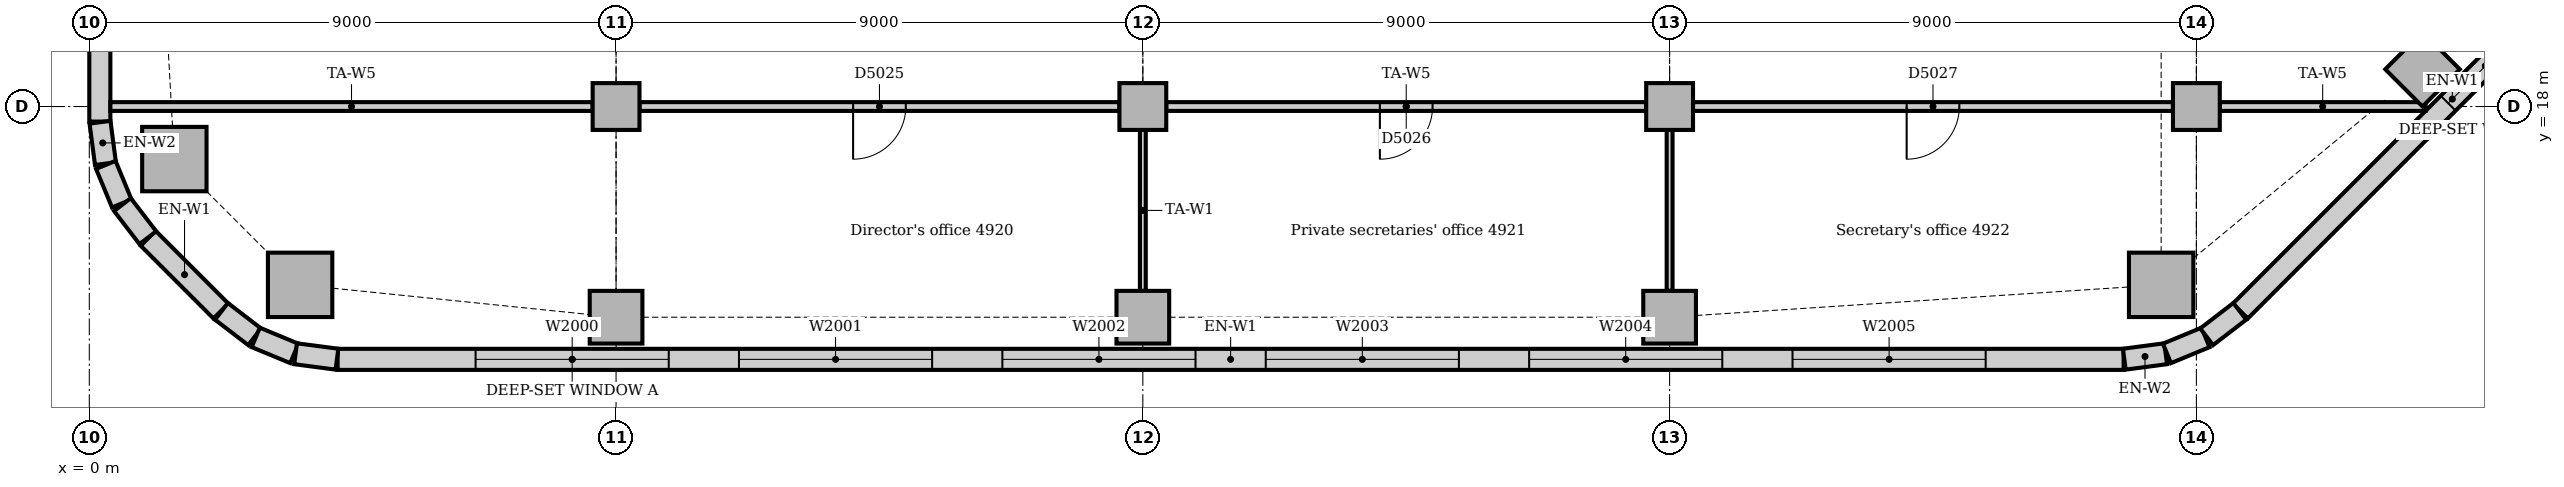
"""IFC4 building model, lengths in metres.
Left out: names, types, materials, properties, quantities, classifications, styles, units other than length and angle.
Written with IfcOpenShell. Run it as: python <this file> out.ifc"""

import sys

from ifc_helpers import new_model, si_unit, direction, frame, frame_2d, origin, origin_2d, place, context, subcontext, project, spatial, rectangle, extrude, element, fill, save


model = new_model("IFC4")
c1 = context("Model", 3, precision=1e-05, world=origin(), true_north=direction((0.0, 1.0)))
c2 = subcontext(c1, "Body", "Model", "MODEL_VIEW")
j1 = project(units=[si_unit("LENGTHUNIT", "METRE"), si_unit("PLANEANGLEUNIT", "RADIAN")], contexts=[c1])
p1 = place(None, origin())
s1 = spatial("IfcSite", under=j1, at=p1, CompositionType="ELEMENT")
p2 = place(p1, origin())
s2 = spatial("IfcBuilding", under=s1, at=p2, CompositionType="ELEMENT")
p3 = place(p2, frame((0.0, 0.0, 206.0)))
s3 = spatial("IfcBuildingStorey", under=s2, at=p3, CompositionType="ELEMENT", Elevation=206.0)
for number, where, z_axis, x_axis in (
    (1, (3.602, 14.953, 0.0), (0.0, 0.0, 1.0), (1.0, 0.0, 0.0)),
    (2, (35.398, 14.953, 0.0), (0.0, 0.0, 1.0), (1.0, 0.0, 0.0)),
    (3, (1.453, 17.102, 0.0), (0.0, 0.0, 1.0), (1.0, 0.0, 0.0)),
):
    element("IfcColumn", number, at=place(p3, frame(where, z_axis=z_axis, x_axis=x_axis)), inside=s3, PredefinedType="COLUMN", context=c2, shape_type="SweptSolid", body=[
        extrude(rectangle(XDim=1.1, YDim=1.1, at=origin_2d()), origin(), (0.0, 0.0, 1.0), 3.85),
    ])
for number, where, z_axis, x_axis in (
    (4, (9.0, 14.4, 0.0), (0.0, 0.0, 1.0), (1.0, 0.0, 0.0)),
    (5, (18.0, 14.4, 0.0), (0.0, 0.0, 1.0), (1.0, 0.0, 0.0)),
    (6, (27.0, 14.4, 0.0), (0.0, 0.0, 1.0), (1.0, 0.0, 0.0)),
    (7, (39.864, 18.636, 0.0), (0.0, 0.0, 1.0), (0.707, 0.707, 0.0)),
):
    element("IfcColumn", number, at=place(p3, frame(where, z_axis=z_axis, x_axis=x_axis)), inside=s3, PredefinedType="COLUMN", context=c2, shape_type="SweptSolid", body=[
        extrude(rectangle(XDim=0.9, YDim=0.9, at=origin_2d()), origin(), (0.0, 0.0, 1.0), 3.85),
    ])
for number, where, z_axis, x_axis in (
    (8, (9.0, 18.0, 0.0), (0.0, 0.0, 1.0), (1.0, 0.0, 0.0)),
    (9, (18.0, 18.0, 0.0), (0.0, 0.0, 1.0), (1.0, 0.0, 0.0)),
    (10, (27.0, 18.0, 0.0), (0.0, 0.0, 1.0), (1.0, 0.0, 0.0)),
    (11, (36.0, 18.0, 0.0), (0.0, 0.0, 1.0), (1.0, 0.0, 0.0)),
):
    element("IfcColumn", number, at=place(p3, frame(where, z_axis=z_axis, x_axis=x_axis)), inside=s3, PredefinedType="COLUMN", context=c2, shape_type="SweptSolid", body=[
        extrude(rectangle(XDim=0.8, YDim=0.8, at=origin_2d()), origin(), (0.0, 0.0, 1.0), 3.85),
    ])
p4 = place(p3, frame((4.243, 13.68, 0.0), z_axis=(0.0, 0.0, 1.0), x_axis=(1.0, 0.0, 0.0)))
e12 = element("IfcWall", 12, at=p4, inside=s3, PredefinedType="STANDARD", context=c2, shape_type="SweptSolid", body=[
    extrude(rectangle(XDim=30.515, YDim=0.36, at=frame_2d((15.257, 0.0))), origin(), (0.0, 0.0, 1.0), 3.85),
])
p5 = place(p4, frame((2.357, 0.0, 0.9)))
e13 = element("IfcOpeningElement", 13, at=p5, cuts=e12, PredefinedType="OPENING", context=c2, shape_type="SweptSolid", body=[
    extrude(rectangle(XDim=3.3, YDim=1.6, at=frame_2d((1.65, 0.8))), frame((0.0, 0.19, 0.0), z_axis=(0.0, -1.0, 0.0), x_axis=(1.0, 0.0, 0.0)), (0.0, 0.0, 1.0), 0.38),
])
p6 = place(p4, frame((6.857, 0.0, 0.9)))
e14 = element("IfcOpeningElement", 14, at=p6, cuts=e12, PredefinedType="OPENING", context=c2, shape_type="SweptSolid", body=[
    extrude(rectangle(XDim=3.3, YDim=1.6, at=frame_2d((1.65, 0.8))), frame((0.0, 0.19, 0.0), z_axis=(0.0, -1.0, 0.0), x_axis=(1.0, 0.0, 0.0)), (0.0, 0.0, 1.0), 0.38),
])
p7 = place(p4, frame((11.357, 0.0, 0.9)))
e15 = element("IfcOpeningElement", 15, at=p7, cuts=e12, PredefinedType="OPENING", context=c2, shape_type="SweptSolid", body=[
    extrude(rectangle(XDim=3.3, YDim=1.6, at=frame_2d((1.65, 0.8))), frame((0.0, 0.19, 0.0), z_axis=(0.0, -1.0, 0.0), x_axis=(1.0, 0.0, 0.0)), (0.0, 0.0, 1.0), 0.38),
])
p8 = place(p4, frame((15.857, 0.0, 0.9)))
e16 = element("IfcOpeningElement", 16, at=p8, cuts=e12, PredefinedType="OPENING", context=c2, shape_type="SweptSolid", body=[
    extrude(rectangle(XDim=3.3, YDim=1.6, at=frame_2d((1.65, 0.8))), frame((0.0, 0.19, 0.0), z_axis=(0.0, -1.0, 0.0), x_axis=(1.0, 0.0, 0.0)), (0.0, 0.0, 1.0), 0.38),
])
p9 = place(p4, frame((20.357, 0.0, 0.9)))
e17 = element("IfcOpeningElement", 17, at=p9, cuts=e12, PredefinedType="OPENING", context=c2, shape_type="SweptSolid", body=[
    extrude(rectangle(XDim=3.3, YDim=1.6, at=frame_2d((1.65, 0.8))), frame((0.0, 0.19, 0.0), z_axis=(0.0, -1.0, 0.0), x_axis=(1.0, 0.0, 0.0)), (0.0, 0.0, 1.0), 0.38),
])
p10 = place(p4, frame((24.857, 0.0, 0.9)))
e18 = element("IfcOpeningElement", 18, at=p10, cuts=e12, PredefinedType="OPENING", context=c2, shape_type="SweptSolid", body=[
    extrude(rectangle(XDim=3.3, YDim=1.6, at=frame_2d((1.65, 0.8))), frame((0.0, 0.19, 0.0), z_axis=(0.0, -1.0, 0.0), x_axis=(1.0, 0.0, 0.0)), (0.0, 0.0, 1.0), 0.38),
])
p11 = place(p3, frame((36.751, 14.506, 0.0), z_axis=(0.0, 0.0, 1.0), x_axis=(0.707106781187, 0.707106781187, 0.0)))
e19 = element("IfcWall", 19, at=p11, inside=s3, PredefinedType="STANDARD", context=c2, shape_type="SweptSolid", body=[
    extrude(rectangle(XDim=10.243, YDim=0.36, at=frame_2d((5.121, 0.0))), origin(), (0.0, 0.0, 1.0), 3.85),
])
p12 = place(p11, frame((5.021, 0.0, 0.9)))
e20 = element("IfcOpeningElement", 20, at=p12, cuts=e19, PredefinedType="OPENING", context=c2, shape_type="SweptSolid", body=[
    extrude(rectangle(XDim=1.8, YDim=1.6, at=frame_2d((0.9, 0.8))), frame((0.0, 0.19, 0.0), z_axis=(0.0, -1.0, 0.0), x_axis=(1.0, 0.0, 0.0)), (0.0, 0.0, 1.0), 0.38),
])
p13 = place(p3, frame((0.18, 21.0, 0.0), z_axis=(0.0, 0.0, 1.0), x_axis=(0.0, -1.0, 0.0)))
e21 = element("IfcWall", 21, at=p13, inside=s3, PredefinedType="STANDARD", context=c2, shape_type="SweptSolid", body=[
    extrude(rectangle(XDim=3.257, YDim=0.36, at=frame_2d((1.629, 0.0))), origin(), (0.0, 0.0, 1.0), 3.85),
])
p14 = place(p3, frame((1.006, 15.749, 0.0), z_axis=(0.0, 0.0, 1.0), x_axis=(0.707106781187, -0.707106781187, 0.0)))
e22 = element("IfcWall", 22, at=p14, inside=s3, PredefinedType="STANDARD", context=c2, shape_type="SweptSolid", body=[
    extrude(rectangle(XDim=1.757, YDim=0.36, at=frame_2d((0.879, 0.0))), origin(), (0.0, 0.0, 1.0), 3.85),
])
for number, where, z_axis, x_axis in (
    (23, (34.769, 13.683, 0.0), (0.0, 0.0, 1.0), (0.991, 0.131, 0.0)),
    (24, (35.497, 13.782, 0.0), (0.0, 0.0, 1.0), (0.924, 0.383, 0.0)),
):
    element("IfcWall", number, at=place(p3, frame(where, z_axis=z_axis, x_axis=x_axis)), inside=s3, PredefinedType="STANDARD", context=c2, shape_type="SweptSolid", body=[
        extrude(rectangle(XDim=0.713, YDim=0.36, at=frame_2d((0.356, 0.0))), origin(), (0.0, 0.0, 1.0), 3.85),
    ])
p15 = place(p3, frame((36.175, 14.066, 0.0), z_axis=(0.0, 0.0, 1.0), x_axis=(0.793321924995, 0.608802368033, 0.0)))
e25 = element("IfcWall", 25, at=p15, inside=s3, PredefinedType="STANDARD", context=c2, shape_type="SweptSolid", body=[
    extrude(rectangle(XDim=0.713, YDim=0.36, at=frame_2d((0.357, 0.0))), origin(), (0.0, 0.0, 1.0), 3.85),
])
for number, where, z_axis, x_axis in (
    (26, (0.183, 17.731, 0.0), (0.0, 0.0, 1.0), (0.131, -0.991, 0.0)),
    (27, (0.282, 17.003, 0.0), (0.0, 0.0, 1.0), (0.383, -0.924, 0.0)),
):
    element("IfcWall", number, at=place(p3, frame(where, z_axis=z_axis, x_axis=x_axis)), inside=s3, PredefinedType="STANDARD", context=c2, shape_type="SweptSolid", body=[
        extrude(rectangle(XDim=0.713, YDim=0.36, at=frame_2d((0.356, 0.0))), origin(), (0.0, 0.0, 1.0), 3.85),
    ])
for number, where, z_axis, x_axis in (
    (28, (0.566, 16.325, 0.0), (0.0, 0.0, 1.0), (0.609, -0.793, 0.0)),
    (29, (2.259, 14.5, 0.0), (0.0, 0.0, 1.0), (0.793, -0.609, 0.0)),
):
    element("IfcWall", number, at=place(p3, frame(where, z_axis=z_axis, x_axis=x_axis)), inside=s3, PredefinedType="STANDARD", context=c2, shape_type="SweptSolid", body=[
        extrude(rectangle(XDim=0.713, YDim=0.36, at=frame_2d((0.357, 0.0))), origin(), (0.0, 0.0, 1.0), 3.85),
    ])
for number, where, z_axis, x_axis in (
    (30, (2.844, 14.055, 0.0), (0.0, 0.0, 1.0), (0.924, -0.383, 0.0)),
    (31, (3.524, 13.776, 0.0), (0.0, 0.0, 1.0), (0.991, -0.131, 0.0)),
):
    element("IfcWall", number, at=place(p3, frame(where, z_axis=z_axis, x_axis=x_axis)), inside=s3, PredefinedType="STANDARD", context=c2, shape_type="SweptSolid", body=[
        extrude(rectangle(XDim=0.713, YDim=0.36, at=frame_2d((0.356, 0.0))), origin(), (0.0, 0.0, 1.0), 3.85),
    ])
p16 = place(p3, frame((36.4, 18.0, 0.0), z_axis=(0.0, 0.0, 1.0), x_axis=(1.0, 0.0, 0.0)))
e32 = element("IfcWall", 32, at=p16, inside=s3, PredefinedType="PARTITIONING", context=c2, shape_type="SweptSolid", body=[
    extrude(rectangle(XDim=3.516, YDim=0.15, at=frame_2d((1.758, 0.0))), origin(), (0.0, 0.0, 1.0), 3.602),
])
p17 = place(p3, frame((27.4, 18.0, 0.0), z_axis=(0.0, 0.0, 1.0), x_axis=(1.0, 0.0, 0.0)))
e33 = element("IfcWall", 33, at=p17, inside=s3, PredefinedType="PARTITIONING", context=c2, shape_type="SweptSolid", body=[
    extrude(rectangle(XDim=8.2, YDim=0.15, at=frame_2d((4.1, 0.0))), origin(), (0.0, 0.0, 1.0), 3.254),
])
p18 = place(p17, frame((3.65, 0.0, 0.0)))
e34 = element("IfcOpeningElement", 34, at=p18, cuts=e33, PredefinedType="OPENING", context=c2, shape_type="SweptSolid", body=[
    extrude(rectangle(XDim=0.9, YDim=2.1, at=frame_2d((0.45, 1.05))), frame((0.0, 0.085, 0.0), z_axis=(0.0, -1.0, 0.0), x_axis=(1.0, 0.0, 0.0)), (0.0, 0.0, 1.0), 0.17),
])
p19 = place(p3, frame((18.4, 18.0, 0.0), z_axis=(0.0, 0.0, 1.0), x_axis=(1.0, 0.0, 0.0)))
e35 = element("IfcWall", 35, at=p19, inside=s3, PredefinedType="PARTITIONING", context=c2, shape_type="SweptSolid", body=[
    extrude(rectangle(XDim=8.2, YDim=0.15, at=frame_2d((4.1, 0.0))), origin(), (0.0, 0.0, 1.0), 3.254),
])
p20 = place(p19, frame((3.65, 0.0, 0.0)))
e36 = element("IfcOpeningElement", 36, at=p20, cuts=e35, PredefinedType="OPENING", context=c2, shape_type="SweptSolid", body=[
    extrude(rectangle(XDim=0.9, YDim=2.1, at=frame_2d((0.45, 1.05))), frame((0.0, 0.085, 0.0), z_axis=(0.0, -1.0, 0.0), x_axis=(1.0, 0.0, 0.0)), (0.0, 0.0, 1.0), 0.17),
])
p21 = place(p3, frame((9.4, 18.0, 0.0), z_axis=(0.0, 0.0, 1.0), x_axis=(1.0, 0.0, 0.0)))
e37 = element("IfcWall", 37, at=p21, inside=s3, PredefinedType="PARTITIONING", context=c2, shape_type="SweptSolid", body=[
    extrude(rectangle(XDim=8.2, YDim=0.15, at=frame_2d((4.1, 0.0))), origin(), (0.0, 0.0, 1.0), 3.254),
])
p22 = place(p21, frame((3.65, 0.0, 0.0)))
e38 = element("IfcOpeningElement", 38, at=p22, cuts=e37, PredefinedType="OPENING", context=c2, shape_type="SweptSolid", body=[
    extrude(rectangle(XDim=0.9, YDim=2.1, at=frame_2d((0.45, 1.05))), frame((0.0, 0.085, 0.0), z_axis=(0.0, -1.0, 0.0), x_axis=(1.0, 0.0, 0.0)), (0.0, 0.0, 1.0), 0.17),
])
p23 = place(p3, frame((0.36, 18.0, 0.0), z_axis=(0.0, 0.0, 1.0), x_axis=(1.0, 0.0, 0.0)))
e39 = element("IfcWall", 39, at=p23, inside=s3, PredefinedType="PARTITIONING", context=c2, shape_type="SweptSolid", body=[
    extrude(rectangle(XDim=8.24, YDim=0.15, at=frame_2d((4.12, 0.0))), origin(), (0.0, 0.0, 1.0), 3.254),
])
for number, where, z_axis, x_axis in (
    (40, (18.0, 14.85, 0.0), (0.0, 0.0, 1.0), (0.0, 1.0, 0.0)),
    (41, (27.0, 14.85, 0.0), (0.0, 0.0, 1.0), (0.0, 1.0, 0.0)),
):
    element("IfcWall", number, at=place(p3, frame(where, z_axis=z_axis, x_axis=x_axis)), inside=s3, PredefinedType="PARTITIONING", context=c2, shape_type="SweptSolid", body=[
        extrude(rectangle(XDim=2.75, YDim=0.1, at=frame_2d((1.375, 0.0))), origin(), (0.0, 0.0, 1.0), 3.652),
    ])
p24 = place(p5, origin())
e42 = element("IfcWindow", 42, at=p24, inside=s3, PartitioningType="SINGLE_PANEL", PredefinedType="WINDOW", context=c2, shape_type="SweptSolid", body=[
    extrude(rectangle(XDim=3.3, YDim=1.6, at=frame_2d((1.65, 0.8))), frame((0.0, 0.13, 0.0), z_axis=(0.0, -1.0, 0.0), x_axis=(1.0, 0.0, 0.0)), (0.0, 0.0, 1.0), 0.06),
])
fill(e13, e42)
p25 = place(p6, origin())
e43 = element("IfcWindow", 43, at=p25, inside=s3, PartitioningType="SINGLE_PANEL", PredefinedType="WINDOW", context=c2, shape_type="SweptSolid", body=[
    extrude(rectangle(XDim=3.3, YDim=1.6, at=frame_2d((1.65, 0.8))), frame((0.0, 0.13, 0.0), z_axis=(0.0, -1.0, 0.0), x_axis=(1.0, 0.0, 0.0)), (0.0, 0.0, 1.0), 0.06),
])
fill(e14, e43)
p26 = place(p7, origin())
e44 = element("IfcWindow", 44, at=p26, inside=s3, PartitioningType="SINGLE_PANEL", PredefinedType="WINDOW", context=c2, shape_type="SweptSolid", body=[
    extrude(rectangle(XDim=3.3, YDim=1.6, at=frame_2d((1.65, 0.8))), frame((0.0, 0.13, 0.0), z_axis=(0.0, -1.0, 0.0), x_axis=(1.0, 0.0, 0.0)), (0.0, 0.0, 1.0), 0.06),
])
fill(e15, e44)
p27 = place(p8, origin())
e45 = element("IfcWindow", 45, at=p27, inside=s3, PartitioningType="SINGLE_PANEL", PredefinedType="WINDOW", context=c2, shape_type="SweptSolid", body=[
    extrude(rectangle(XDim=3.3, YDim=1.6, at=frame_2d((1.65, 0.8))), frame((0.0, 0.13, 0.0), z_axis=(0.0, -1.0, 0.0), x_axis=(1.0, 0.0, 0.0)), (0.0, 0.0, 1.0), 0.06),
])
fill(e16, e45)
p28 = place(p9, origin())
e46 = element("IfcWindow", 46, at=p28, inside=s3, PartitioningType="SINGLE_PANEL", PredefinedType="WINDOW", context=c2, shape_type="SweptSolid", body=[
    extrude(rectangle(XDim=3.3, YDim=1.6, at=frame_2d((1.65, 0.8))), frame((0.0, 0.13, 0.0), z_axis=(0.0, -1.0, 0.0), x_axis=(1.0, 0.0, 0.0)), (0.0, 0.0, 1.0), 0.06),
])
fill(e17, e46)
p29 = place(p10, origin())
e47 = element("IfcWindow", 47, at=p29, inside=s3, PartitioningType="SINGLE_PANEL", PredefinedType="WINDOW", context=c2, shape_type="SweptSolid", body=[
    extrude(rectangle(XDim=3.3, YDim=1.6, at=frame_2d((1.65, 0.8))), frame((0.0, 0.13, 0.0), z_axis=(0.0, -1.0, 0.0), x_axis=(1.0, 0.0, 0.0)), (0.0, 0.0, 1.0), 0.06),
])
fill(e18, e47)
p30 = place(p12, origin())
e48 = element("IfcWindow", 48, at=p30, inside=s3, PartitioningType="SINGLE_PANEL", PredefinedType="WINDOW", context=c2, shape_type="SweptSolid", body=[
    extrude(rectangle(XDim=1.8, YDim=1.6, at=frame_2d((0.9, 0.8))), frame((0.0, 0.13, 0.0), z_axis=(0.0, -1.0, 0.0), x_axis=(1.0, 0.0, 0.0)), (0.0, 0.0, 1.0), 0.06),
])
fill(e20, e48)
p31 = place(p22, frame((0.9, 0.0, 0.0), z_axis=(0.0, 0.0, 1.0), x_axis=(-1.0, 0.0, 0.0)))
e49 = element("IfcDoor", 49, at=p31, inside=s3, OperationType="SINGLE_SWING_RIGHT", PredefinedType="DOOR", context=c2, shape_type="SweptSolid", body=[
    extrude(rectangle(XDim=0.9, YDim=2.1, at=frame_2d((0.45, 1.05))), frame((0.0, 0.025, 0.0), z_axis=(0.0, -1.0, 0.0), x_axis=(1.0, 0.0, 0.0)), (0.0, 0.0, 1.0), 0.05),
])
fill(e38, e49)
p32 = place(p20, frame((0.9, 0.0, 0.0), z_axis=(0.0, 0.0, 1.0), x_axis=(-1.0, 0.0, 0.0)))
e50 = element("IfcDoor", 50, at=p32, inside=s3, OperationType="SINGLE_SWING_RIGHT", PredefinedType="DOOR", context=c2, shape_type="SweptSolid", body=[
    extrude(rectangle(XDim=0.9, YDim=2.1, at=frame_2d((0.45, 1.05))), frame((0.0, 0.025, 0.0), z_axis=(0.0, -1.0, 0.0), x_axis=(1.0, 0.0, 0.0)), (0.0, 0.0, 1.0), 0.05),
])
fill(e36, e50)
p33 = place(p18, frame((0.9, 0.0, 0.0), z_axis=(0.0, 0.0, 1.0), x_axis=(-1.0, 0.0, 0.0)))
e51 = element("IfcDoor", 51, at=p33, inside=s3, OperationType="SINGLE_SWING_RIGHT", PredefinedType="DOOR", context=c2, shape_type="SweptSolid", body=[
    extrude(rectangle(XDim=0.9, YDim=2.1, at=frame_2d((0.45, 1.05))), frame((0.0, 0.025, 0.0), z_axis=(0.0, -1.0, 0.0), x_axis=(1.0, 0.0, 0.0)), (0.0, 0.0, 1.0), 0.05),
])
fill(e34, e51)
save(model, sys.argv[1])
